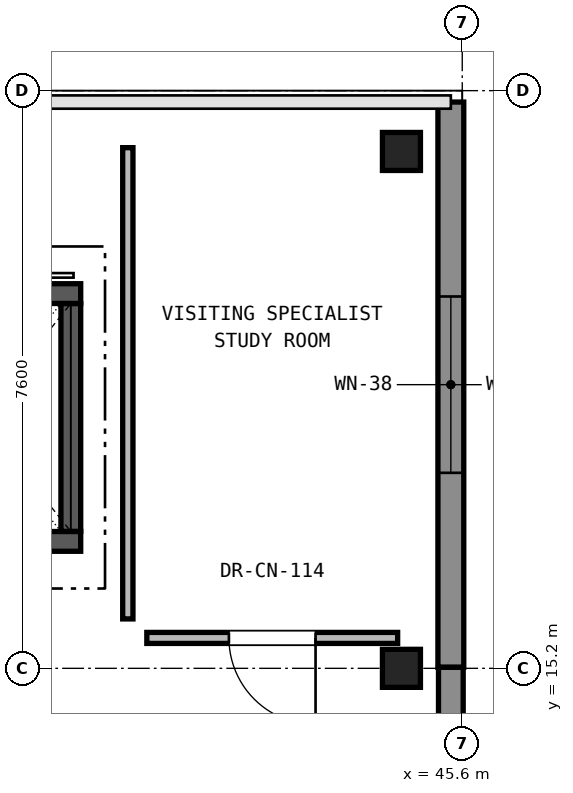
"""IFC4 building model, lengths in metres.
Left out: names, types, materials, properties, quantities, classifications, styles, units other than length and angle.
Written with IfcOpenShell. Run it as: python <this file> out.ifc"""

import sys

from ifc_helpers import new_model, si_unit, direction, frame, frame_2d, origin, origin_2d, place, context, subcontext, project, spatial, rectangle, extrude, element, fill, save


model = new_model("IFC4")
c1 = context("Model", 3, precision=1e-05, world=origin(), true_north=direction((0.0, 1.0)))
c2 = subcontext(c1, "Body", "Model", "MODEL_VIEW")
j1 = project(units=[si_unit("LENGTHUNIT", "METRE"), si_unit("PLANEANGLEUNIT", "RADIAN")], contexts=[c1])
p1 = place(None, origin())
s1 = spatial("IfcSite", under=j1, at=p1, CompositionType="ELEMENT")
p2 = place(p1, origin())
s2 = spatial("IfcBuilding", under=s1, at=p2, CompositionType="ELEMENT")
p3 = place(p2, frame((0.0, 0.0, 21.76)))
s3 = spatial("IfcBuildingStorey", under=s2, at=p3, CompositionType="ELEMENT", Elevation=21.76)
for number, where, z_axis, x_axis in (
    (1, (44.8, 15.2, 0.0), (0.0, 0.0, 1.0), (1.0, 0.0, 0.0)),
    (2, (44.8, 22.0, 0.0), (0.0, 0.0, 1.0), (1.0, 0.0, 0.0)),
):
    element("IfcColumn", number, at=place(p3, frame(where, z_axis=z_axis, x_axis=x_axis)), inside=s3, PredefinedType="COLUMN", context=c2, shape_type="SweptSolid", body=[
        extrude(rectangle(XDim=0.5, YDim=0.5, at=origin_2d()), origin(), (0.0, 0.0, 1.0), 4.08),
    ])
p4 = place(p3, frame((45.45, 22.65, 0.0), z_axis=(0.0, 0.0, 1.0), x_axis=(0.0, -1.0, 0.0)))
e3 = element("IfcWall", 3, at=p4, inside=s3, PredefinedType="SOLIDWALL", context=c2, shape_type="SweptSolid", body=[
    extrude(rectangle(XDim=7.437, YDim=0.34, at=frame_2d((3.718, 0.0))), origin(), (0.0, 0.0, 1.0), 3.81),
])
p5 = place(p4, frame((2.558, 0.0, 0.9)))
e4 = element("IfcOpeningElement", 4, at=p5, cuts=e3, PredefinedType="OPENING", context=c2, shape_type="SweptSolid", body=[
    extrude(rectangle(XDim=2.32, YDim=1.62, at=frame_2d((1.16, 0.81))), frame((0.0, 0.18, 0.0), z_axis=(0.0, -1.0, 0.0), x_axis=(1.0, 0.0, 0.0)), (0.0, 0.0, 1.0), 0.36),
])
p6 = place(p3, frame((45.45, 15.213, 0.0), z_axis=(0.0, 0.0, 1.0), x_axis=(0.0, -1.0, 0.0)))
e5 = element("IfcWall", 5, at=p6, inside=s3, PredefinedType="SOLIDWALL", context=c2, shape_type="SweptSolid", body=[
    extrude(rectangle(XDim=7.437, YDim=0.325, at=frame_2d((3.718, 0.0))), origin(), (0.0, 0.0, 1.0), 3.81),
])
p7 = place(p6, frame((2.993, 0.0, 0.0)))
e6 = element("IfcOpeningElement", 6, at=p7, cuts=e5, PredefinedType="OPENING", context=c2, shape_type="SweptSolid", body=[
    extrude(rectangle(XDim=1.45, YDim=2.2, at=frame_2d((0.725, 1.1))), frame((0.0, 0.172, 0.0), z_axis=(0.0, -1.0, 0.0), x_axis=(1.0, 0.0, 0.0)), (0.0, 0.0, 1.0), 0.345),
])
p8 = place(p3, frame((45.47, 0.28, 4.08), z_axis=(0.0, 0.0, 1.0), x_axis=(0.0, 1.0, 0.0)))
e7 = element("IfcWall", 7, at=p8, inside=s3, PredefinedType="PARAPET", context=c2, shape_type="SweptSolid", body=[
    extrude(rectangle(XDim=22.24, YDim=0.245, at=frame_2d((11.12, 0.0))), origin(), (0.0, 0.0, 1.0), 1.2),
])
p9 = place(p3, frame((45.47, 22.67, 4.08), z_axis=(0.0, 0.0, 1.0), x_axis=(-1.0, 0.0, 0.0)))
e8 = element("IfcWall", 8, at=p9, inside=s3, PredefinedType="PARAPET", context=c2, shape_type="SweptSolid", body=[
    extrude(rectangle(XDim=45.34, YDim=0.245, at=frame_2d((22.67, 0.0))), origin(), (0.0, 0.0, 1.0), 1.2),
])
p10 = place(p3, frame((37.922, 16.87, 0.0), z_axis=(0.0, 0.0, 1.0), x_axis=(1.0, 0.0, 0.0)))
e9 = element("IfcWall", 9, at=p10, inside=s3, PredefinedType="SHEAR", context=c2, shape_type="SweptSolid", body=[
    extrude(rectangle(XDim=2.658, YDim=0.26, at=frame_2d((1.329, 0.0))), origin(), (0.0, 0.0, 1.0), 3.81),
])
p11 = place(p3, frame((37.922, 20.13, 0.0), z_axis=(0.0, 0.0, 1.0), x_axis=(1.0, 0.0, 0.0)))
e10 = element("IfcWall", 10, at=p11, inside=s3, PredefinedType="SHEAR", context=c2, shape_type="SweptSolid", body=[
    extrude(rectangle(XDim=2.658, YDim=0.26, at=frame_2d((1.329, 0.0))), origin(), (0.0, 0.0, 1.0), 3.81),
])
p12 = place(p11, frame((0.679, 0.0, 0.0)))
e11 = element("IfcOpeningElement", 11, at=p12, cuts=e10, PredefinedType="OPENING", context=c2, shape_type="SweptSolid", body=[
    extrude(rectangle(XDim=1.3, YDim=2.2, at=frame_2d((0.65, 1.1))), frame((0.0, 0.14, 0.0), z_axis=(0.0, -1.0, 0.0), x_axis=(1.0, 0.0, 0.0)), (0.0, 0.0, 1.0), 0.28),
])
p13 = place(p3, frame((40.45, 17.002, 0.0), z_axis=(0.0, 0.0, 1.0), x_axis=(0.0, 1.0, 0.0)))
e12 = element("IfcWall", 12, at=p13, inside=s3, PredefinedType="SHEAR", context=c2, shape_type="SweptSolid", body=[
    extrude(rectangle(XDim=2.996, YDim=0.26, at=frame_2d((1.498, 0.0))), origin(), (0.0, 0.0, 1.0), 3.81),
])
p14 = place(p3, frame((44.75, 15.6, 0.0), z_axis=(0.0, 0.0, 1.0), x_axis=(-1.0, 0.0, 0.0)))
e13 = element("IfcWall", 13, at=p14, inside=s3, PredefinedType="PARTITIONING", context=c2, shape_type="SweptSolid", body=[
    extrude(rectangle(XDim=3.3, YDim=0.145, at=frame_2d((1.65, 0.0))), origin(), (0.0, 0.0, 1.0), 3.11),
])
p15 = place(p14, frame((1.08, 0.0, 0.0)))
e14 = element("IfcOpeningElement", 14, at=p15, cuts=e13, PredefinedType="OPENING", context=c2, shape_type="SweptSolid", body=[
    extrude(rectangle(XDim=1.14, YDim=2.2, at=frame_2d((0.57, 1.1))), frame((0.0, 0.083, 0.0), z_axis=(0.0, -1.0, 0.0), x_axis=(1.0, 0.0, 0.0)), (0.0, 0.0, 1.0), 0.165),
])
p16 = place(p3, frame((41.2, 15.85, 0.0), z_axis=(0.0, 0.0, 1.0), x_axis=(0.0, 1.0, 0.0)))
e15 = element("IfcWall", 15, at=p16, inside=s3, PredefinedType="PARTITIONING", context=c2, shape_type="SweptSolid", body=[
    extrude(rectangle(XDim=6.2, YDim=0.135, at=frame_2d((3.1, 0.0))), origin(), (0.0, 0.0, 1.0), 3.11),
])
p17 = place(p5, origin())
e16 = element("IfcWindow", 16, at=p17, inside=s3, PartitioningType="SINGLE_PANEL", PredefinedType="WINDOW", context=c2, shape_type="SweptSolid", body=[
    extrude(rectangle(XDim=2.32, YDim=1.62, at=frame_2d((1.16, 0.81))), frame((0.0, 0.03, 0.0), z_axis=(0.0, -1.0, 0.0), x_axis=(1.0, 0.0, 0.0)), (0.0, 0.0, 1.0), 0.06),
])
fill(e4, e16)
p18 = place(p15, origin())
e17 = element("IfcDoor", 17, at=p18, inside=s3, OperationType="SINGLE_SWING_LEFT", PredefinedType="DOOR", context=c2, shape_type="SweptSolid", body=[
    extrude(rectangle(XDim=1.14, YDim=2.2, at=frame_2d((0.57, 1.1))), frame((0.0, 0.025, 0.0), z_axis=(0.0, -1.0, 0.0), x_axis=(1.0, 0.0, 0.0)), (0.0, 0.0, 1.0), 0.05),
])
fill(e14, e17)
save(model, sys.argv[1])
